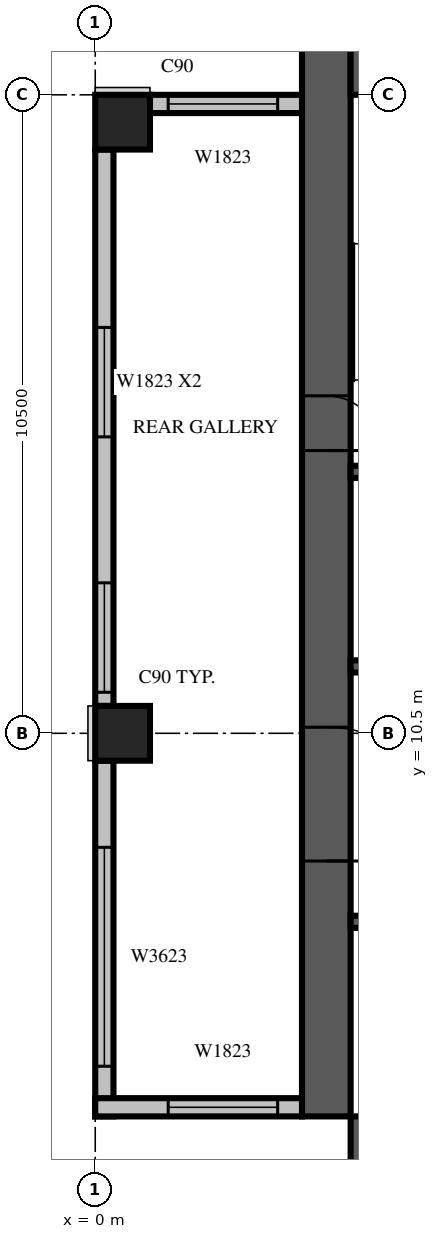
"""IFC4 building model, lengths in metres.
Left out: names, types, materials, properties, quantities, classifications, styles, units other than length and angle.
Written with IfcOpenShell. Run it as: python <this file> out.ifc"""

import sys

from ifc_helpers import new_model, si_unit, direction, frame, frame_2d, origin, origin_2d, place, context, subcontext, project, spatial, rectangle, extrude, source, transform, mapped, element, fill, save


model = new_model("IFC4")
c1 = context("Model", 3, precision=1e-05, world=origin(), true_north=direction((0.0, 1.0)))
c2 = subcontext(c1, "Body", "Model", "MODEL_VIEW")
j1 = project(units=[si_unit("LENGTHUNIT", "METRE"), si_unit("PLANEANGLEUNIT", "RADIAN")], contexts=[c1])
p1 = place(None, origin())
s1 = spatial("IfcSite", under=j1, at=p1, CompositionType="ELEMENT")
p2 = place(p1, origin())
s2 = spatial("IfcBuilding", under=s1, at=p2, CompositionType="ELEMENT")
p3 = place(p2, frame((0.0, 0.0, 196.8)))
s3 = spatial("IfcBuildingStorey", under=s2, at=p3, CompositionType="ELEMENT", Elevation=196.8)
m1 = source(origin(), c2, "Body", "SweptSolid", [
    extrude(rectangle(XDim=0.9, YDim=0.9, at=origin_2d()), origin(), (0.0, 0.0, 1.0), 3.8),
])
for number, where, z_axis, x_axis in (
    (1, (0.45, 10.5, 0.0), (0.0, 0.0, 1.0), (1.0, 0.0, 0.0)),
    (2, (0.45, 20.55, 0.0), (0.0, 0.0, 1.0), (1.0, 0.0, 0.0)),
):
    element("IfcColumn", number, at=place(p3, frame(where, z_axis=z_axis, x_axis=x_axis)), inside=s3, PredefinedType="COLUMN", context=c2, shape_type="MappedRepresentation", body=[
        mapped(m1, transform((0.0, 0.0, 0.0), scale=1.0)),
    ])
m2 = source(origin(), c2, "Body", "SweptSolid", [
    extrude(rectangle(XDim=17.6, YDim=0.8, at=frame_2d((8.8, 0.0))), origin(), (0.0, 0.0, 1.0), 3.8),
])
p4 = place(p3, frame((3.8, 4.2, 0.0), z_axis=(0.0, 0.0, 1.0), x_axis=(0.0, 1.0, 0.0)))
e3 = element("IfcWall", 3, at=p4, inside=s3, PredefinedType="SHEAR", context=c2, shape_type="MappedRepresentation", body=[
    mapped(m2, transform((0.0, 0.0, 0.0), scale=1.0)),
])
m3 = source(origin(), c2, "Body", "SweptSolid", [
    extrude(rectangle(XDim=2.2, YDim=2.1, at=frame_2d((1.1, 1.05))), frame((0.0, 0.41, 0.0), z_axis=(0.0, -1.0, 0.0), x_axis=(1.0, 0.0, 0.0)), (0.0, 0.0, 1.0), 0.82),
])
p5 = place(p4, frame((4.2, 0.0, 0.0)))
e4 = element("IfcOpeningElement", 4, at=p5, cuts=e3, PredefinedType="OPENING", context=c2, shape_type="MappedRepresentation", body=[
    mapped(m3, transform((0.0, 0.0, 0.0), scale=1.0)),
])
m4 = source(origin(), c2, "Body", "SweptSolid", [
    extrude(rectangle(XDim=0.9, YDim=2.1, at=frame_2d((0.45, 1.05))), frame((0.0, 0.41, 0.0), z_axis=(0.0, -1.0, 0.0), x_axis=(1.0, 0.0, 0.0)), (0.0, 0.0, 1.0), 0.82),
])
p6 = place(p4, frame((10.95, 0.0, 0.0)))
e5 = element("IfcOpeningElement", 5, at=p6, cuts=e3, PredefinedType="OPENING", context=c2, shape_type="MappedRepresentation", body=[
    mapped(m4, transform((0.0, 0.0, 0.0), scale=1.0)),
])
p7 = place(p3, frame((4.2, 3.8, 0.0), z_axis=(0.0, 0.0, 1.0), x_axis=(1.0, 0.0, 0.0)))
e6 = element("IfcWall", 6, at=p7, inside=s3, PredefinedType="SHEAR", context=c2, shape_type="MappedRepresentation", body=[
    mapped(m2, transform((0.0, 0.0, 0.0), scale=1.0)),
])
p8 = place(p7, frame((12.75, 0.0, 0.0)))
e7 = element("IfcOpeningElement", 7, at=p8, cuts=e6, PredefinedType="OPENING", context=c2, shape_type="MappedRepresentation", body=[
    mapped(m4, transform((0.0, 0.0, 0.0), scale=1.0)),
])
m5 = source(origin(), c2, "Body", "SweptSolid", [
    extrude(rectangle(XDim=16.8, YDim=0.8, at=frame_2d((8.4, 0.0))), origin(), (0.0, 0.0, 1.0), 3.8),
])
p9 = place(p3, frame((4.2, 21.4, 0.0), z_axis=(0.0, 0.0, 1.0), x_axis=(1.0, 0.0, 0.0)))
e8 = element("IfcWall", 8, at=p9, inside=s3, PredefinedType="SHEAR", context=c2, shape_type="MappedRepresentation", body=[
    mapped(m5, transform((0.0, 0.0, 0.0), scale=1.0)),
])
m6 = source(origin(), c2, "Body", "SweptSolid", [
    extrude(rectangle(XDim=1.2, YDim=2.1, at=frame_2d((0.6, 1.05))), frame((0.0, 0.41, 0.0), z_axis=(0.0, -1.0, 0.0), x_axis=(1.0, 0.0, 0.0)), (0.0, 0.0, 1.0), 0.82),
])
p10 = place(p9, frame((6.2, 0.0, 0.0)))
e9 = element("IfcOpeningElement", 9, at=p10, cuts=e8, PredefinedType="OPENING", context=c2, shape_type="MappedRepresentation", body=[
    mapped(m6, transform((0.0, 0.0, 0.0), scale=1.0)),
])
m7 = source(origin(), c2, "Body", "SweptSolid", [
    extrude(rectangle(XDim=2.5, YDim=0.3, at=frame_2d((1.25, 0.0))), origin(), (0.0, 0.0, 1.0), 3.4),
])
p11 = place(p3, frame((3.4, 20.85, 0.0), z_axis=(0.0, 0.0, 1.0), x_axis=(-1.0, 0.0, 0.0)))
e10 = element("IfcWall", 10, at=p11, inside=s3, PredefinedType="STANDARD", context=c2, shape_type="MappedRepresentation", body=[
    mapped(m7, transform((0.0, 0.0, 0.0), scale=1.0)),
])
m8 = source(origin(), c2, "Body", "SweptSolid", [
    extrude(rectangle(XDim=1.8, YDim=2.3, at=frame_2d((0.9, 1.15))), frame((0.0, 0.16, 0.0), z_axis=(0.0, -1.0, 0.0), x_axis=(1.0, 0.0, 0.0)), (0.0, 0.0, 1.0), 0.32),
])
p12 = place(p11, frame((0.4, 0.0, 0.6)))
e11 = element("IfcOpeningElement", 11, at=p12, cuts=e10, PredefinedType="OPENING", context=c2, shape_type="MappedRepresentation", body=[
    mapped(m8, transform((0.0, 0.0, 0.0), scale=1.0)),
])
m9 = source(origin(), c2, "Body", "SweptSolid", [
    extrude(rectangle(XDim=9.15, YDim=0.3, at=frame_2d((4.575, 0.0))), origin(), (0.0, 0.0, 1.0), 3.4),
])
p13 = place(p3, frame((0.15, 20.1, 0.0), z_axis=(0.0, 0.0, 1.0), x_axis=(0.0, -1.0, 0.0)))
e12 = element("IfcWall", 12, at=p13, inside=s3, PredefinedType="STANDARD", context=c2, shape_type="MappedRepresentation", body=[
    mapped(m9, transform((0.0, 0.0, 0.0), scale=1.0)),
])
p14 = place(p13, frame((2.925, 0.0, 0.6)))
e13 = element("IfcOpeningElement", 13, at=p14, cuts=e12, PredefinedType="OPENING", context=c2, shape_type="MappedRepresentation", body=[
    mapped(m8, transform((0.0, 0.0, 0.0), scale=1.0)),
])
p15 = place(p13, frame((7.125, 0.0, 0.6)))
e14 = element("IfcOpeningElement", 14, at=p15, cuts=e12, PredefinedType="OPENING", context=c2, shape_type="MappedRepresentation", body=[
    mapped(m8, transform((0.0, 0.0, 0.0), scale=1.0)),
])
m10 = source(origin(), c2, "Body", "SweptSolid", [
    extrude(rectangle(XDim=5.85, YDim=0.3, at=frame_2d((2.925, 0.0))), origin(), (0.0, 0.0, 1.0), 3.4),
])
p16 = place(p3, frame((0.15, 10.05, 0.0), z_axis=(0.0, 0.0, 1.0), x_axis=(0.0, -1.0, 0.0)))
e15 = element("IfcWall", 15, at=p16, inside=s3, PredefinedType="STANDARD", context=c2, shape_type="MappedRepresentation", body=[
    mapped(m10, transform((0.0, 0.0, 0.0), scale=1.0)),
])
m11 = source(origin(), c2, "Body", "SweptSolid", [
    extrude(rectangle(XDim=3.6, YDim=2.3, at=frame_2d((1.8, 1.15))), frame((0.0, 0.16, 0.0), z_axis=(0.0, -1.0, 0.0), x_axis=(1.0, 0.0, 0.0)), (0.0, 0.0, 1.0), 0.32),
])
p17 = place(p16, frame((1.425, 0.0, 0.6)))
e16 = element("IfcOpeningElement", 16, at=p17, cuts=e15, PredefinedType="OPENING", context=c2, shape_type="MappedRepresentation", body=[
    mapped(m11, transform((0.0, 0.0, 0.0), scale=1.0)),
])
m12 = source(origin(), c2, "Body", "SweptSolid", [
    extrude(rectangle(XDim=3.4, YDim=0.3, at=frame_2d((1.7, 0.0))), origin(), (0.0, 0.0, 1.0), 3.4),
])
p18 = place(p3, frame((0.0, 4.35, 0.0), z_axis=(0.0, 0.0, 1.0), x_axis=(1.0, 0.0, 0.0)))
e17 = element("IfcWall", 17, at=p18, inside=s3, PredefinedType="STANDARD", context=c2, shape_type="MappedRepresentation", body=[
    mapped(m12, transform((0.0, 0.0, 0.0), scale=1.0)),
])
p19 = place(p18, frame((1.2, 0.0, 0.6)))
e18 = element("IfcOpeningElement", 18, at=p19, cuts=e17, PredefinedType="OPENING", context=c2, shape_type="MappedRepresentation", body=[
    mapped(m8, transform((0.0, 0.0, 0.0), scale=1.0)),
])
m13 = source(origin(), c2, "Body", "SweptSolid", [
    extrude(rectangle(XDim=9.6, YDim=0.2, at=frame_2d((4.8, 0.0))), origin(), (0.0, 0.0, 1.0), 3.8),
])
p20 = place(p3, frame((4.2, 7.4, 0.0), z_axis=(0.0, 0.0, 1.0), x_axis=(1.0, 0.0, 0.0)))
e19 = element("IfcWall", 19, at=p20, inside=s3, PredefinedType="SOLIDWALL", context=c2, shape_type="MappedRepresentation", body=[
    mapped(m13, transform((0.0, 0.0, 0.0), scale=1.0)),
])
m14 = source(origin(), c2, "Body", "SweptSolid", [
    extrude(rectangle(XDim=1.1, YDim=2.1, at=frame_2d((0.55, 1.05))), frame((0.0, 0.11, 0.0), z_axis=(0.0, -1.0, 0.0), x_axis=(1.0, 0.0, 0.0)), (0.0, 0.0, 1.0), 0.22),
])
p21 = place(p20, frame((0.65, 0.0, 0.0)))
e20 = element("IfcOpeningElement", 20, at=p21, cuts=e19, PredefinedType="OPENING", context=c2, shape_type="MappedRepresentation", body=[
    mapped(m14, transform((0.0, 0.0, 0.0), scale=1.0)),
])
p22 = place(p20, frame((3.05, 0.0, 0.0)))
e21 = element("IfcOpeningElement", 21, at=p22, cuts=e19, PredefinedType="OPENING", context=c2, shape_type="MappedRepresentation", body=[
    mapped(m14, transform((0.0, 0.0, 0.0), scale=1.0)),
])
p23 = place(p20, frame((5.45, 0.0, 0.0)))
e22 = element("IfcOpeningElement", 22, at=p23, cuts=e19, PredefinedType="OPENING", context=c2, shape_type="MappedRepresentation", body=[
    mapped(m14, transform((0.0, 0.0, 0.0), scale=1.0)),
])
p24 = place(p20, frame((7.85, 0.0, 0.0)))
e23 = element("IfcOpeningElement", 23, at=p24, cuts=e19, PredefinedType="OPENING", context=c2, shape_type="MappedRepresentation", body=[
    mapped(m14, transform((0.0, 0.0, 0.0), scale=1.0)),
])
m15 = source(origin(), c2, "Body", "SweptSolid", [
    extrude(rectangle(XDim=4.8, YDim=0.2, at=frame_2d((2.4, 0.0))), origin(), (0.0, 0.0, 1.0), 3.8),
])
p25 = place(p3, frame((4.2, 11.6, 0.0), z_axis=(0.0, 0.0, 1.0), x_axis=(1.0, 0.0, 0.0)))
e24 = element("IfcWall", 24, at=p25, inside=s3, PredefinedType="SOLIDWALL", context=c2, shape_type="MappedRepresentation", body=[
    mapped(m15, transform((0.0, 0.0, 0.0), scale=1.0)),
])
p26 = place(p25, frame((0.65, 0.0, 0.0)))
e25 = element("IfcOpeningElement", 25, at=p26, cuts=e24, PredefinedType="OPENING", context=c2, shape_type="MappedRepresentation", body=[
    mapped(m14, transform((0.0, 0.0, 0.0), scale=1.0)),
])
p27 = place(p25, frame((3.05, 0.0, 0.0)))
e26 = element("IfcOpeningElement", 26, at=p27, cuts=e24, PredefinedType="OPENING", context=c2, shape_type="MappedRepresentation", body=[
    mapped(m14, transform((0.0, 0.0, 0.0), scale=1.0)),
])
p28 = place(p3, frame((4.2, 14.8, 0.0), z_axis=(0.0, 0.0, 1.0), x_axis=(1.0, 0.0, 0.0)))
e27 = element("IfcWall", 27, at=p28, inside=s3, PredefinedType="SOLIDWALL", context=c2, shape_type="MappedRepresentation", body=[
    mapped(m15, transform((0.0, 0.0, 0.0), scale=1.0)),
])
m16 = source(origin(), c2, "Body", "SweptSolid", [
    extrude(rectangle(XDim=1.8, YDim=2.3, at=frame_2d((0.9, 1.15))), frame((0.0, 0.03, 0.0), z_axis=(0.0, -1.0, 0.0), x_axis=(1.0, 0.0, 0.0)), (0.0, 0.0, 1.0), 0.06),
])
p29 = place(p12, origin())
e28 = element("IfcWindow", 28, at=p29, inside=s3, PartitioningType="SINGLE_PANEL", PredefinedType="WINDOW", context=c2, shape_type="MappedRepresentation", body=[
    mapped(m16, transform((0.0, 0.0, 0.0), scale=1.0)),
])
fill(e11, e28)
p30 = place(p14, origin())
e29 = element("IfcWindow", 29, at=p30, inside=s3, PartitioningType="SINGLE_PANEL", PredefinedType="WINDOW", context=c2, shape_type="MappedRepresentation", body=[
    mapped(m16, transform((0.0, 0.0, 0.0), scale=1.0)),
])
fill(e13, e29)
p31 = place(p15, origin())
e30 = element("IfcWindow", 30, at=p31, inside=s3, PartitioningType="SINGLE_PANEL", PredefinedType="WINDOW", context=c2, shape_type="MappedRepresentation", body=[
    mapped(m16, transform((0.0, 0.0, 0.0), scale=1.0)),
])
fill(e14, e30)
m17 = source(origin(), c2, "Body", "SweptSolid", [
    extrude(rectangle(XDim=3.6, YDim=2.3, at=frame_2d((1.8, 1.15))), frame((0.0, 0.03, 0.0), z_axis=(0.0, -1.0, 0.0), x_axis=(1.0, 0.0, 0.0)), (0.0, 0.0, 1.0), 0.06),
])
p32 = place(p17, origin())
e31 = element("IfcWindow", 31, at=p32, inside=s3, PartitioningType="SINGLE_PANEL", PredefinedType="WINDOW", context=c2, shape_type="MappedRepresentation", body=[
    mapped(m17, transform((0.0, 0.0, 0.0), scale=1.0)),
])
fill(e16, e31)
p33 = place(p19, origin())
e32 = element("IfcWindow", 32, at=p33, inside=s3, PartitioningType="SINGLE_PANEL", PredefinedType="WINDOW", context=c2, shape_type="MappedRepresentation", body=[
    mapped(m16, transform((0.0, 0.0, 0.0), scale=1.0)),
])
fill(e18, e32)
m18 = source(origin(), c2, "Body", "SweptSolid", [
    extrude(rectangle(XDim=2.2, YDim=2.1, at=frame_2d((1.1, 1.05))), frame((0.0, 0.025, 0.0), z_axis=(0.0, -1.0, 0.0), x_axis=(1.0, 0.0, 0.0)), (0.0, 0.0, 1.0), 0.05),
])
p34 = place(p5, origin())
e33 = element("IfcDoor", 33, at=p34, inside=s3, OperationType="DOUBLE_DOOR_SINGLE_SWING", PredefinedType="DOOR", context=c2, shape_type="MappedRepresentation", body=[
    mapped(m18, transform((0.0, 0.0, 0.0), scale=1.0)),
])
fill(e4, e33)
m19 = source(origin(), c2, "Body", "SweptSolid", [
    extrude(rectangle(XDim=0.9, YDim=2.1, at=frame_2d((0.45, 1.05))), frame((0.0, 0.025, 0.0), z_axis=(0.0, -1.0, 0.0), x_axis=(1.0, 0.0, 0.0)), (0.0, 0.0, 1.0), 0.05),
])
p35 = place(p6, origin())
e34 = element("IfcDoor", 34, at=p35, inside=s3, OperationType="SINGLE_SWING_RIGHT", PredefinedType="DOOR", context=c2, shape_type="MappedRepresentation", body=[
    mapped(m19, transform((0.0, 0.0, 0.0), scale=1.0)),
])
fill(e5, e34)
save(model, sys.argv[1])
